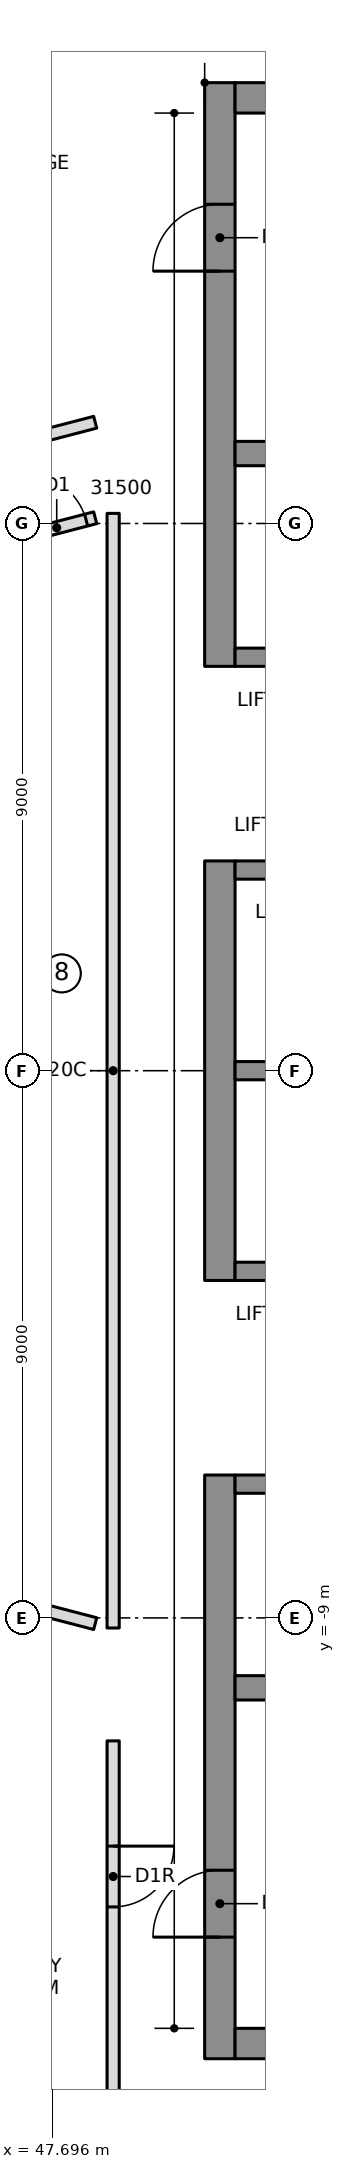
"""IFC4 building model, lengths in metres.
Left out: names, types, materials, properties, quantities, classifications, styles, units other than length and angle.
Written with IfcOpenShell. Run it as: python <this file> out.ifc"""

import sys

from ifc_helpers import new_model, si_unit, direction, frame, frame_2d, origin, place, context, subcontext, project, spatial, rectangle, extrude, element, fill, save


model = new_model("IFC4")
c1 = context("Model", 3, precision=1e-05, world=origin(), true_north=direction((0.0, 1.0)))
c2 = subcontext(c1, "Body", "Model", "MODEL_VIEW")
j1 = project(units=[si_unit("LENGTHUNIT", "METRE"), si_unit("PLANEANGLEUNIT", "RADIAN")], contexts=[c1])
p1 = place(None, origin())
s1 = spatial("IfcSite", under=j1, at=p1, CompositionType="ELEMENT")
p2 = place(p1, origin())
s2 = spatial("IfcBuilding", under=s1, at=p2, CompositionType="ELEMENT")
p3 = place(p2, frame((0.0, 0.0, 313.2)))
s3 = spatial("IfcBuildingStorey", under=s2, at=p3, CompositionType="ELEMENT", Elevation=313.2)
p4 = place(p3, frame((50.45, 6.65, 0.0), z_axis=(0.0, 0.0, 1.0), x_axis=(0.0, 1.0, 0.0)))
e1 = element("IfcWall", 1, at=p4, inside=s3, PredefinedType="SHEAR", context=c2, shape_type="SweptSolid", body=[
    extrude(rectangle(XDim=9.6, YDim=0.5, at=frame_2d((4.8, 0.0))), origin(), (0.0, 0.0, 1.0), 5.4),
])
p5 = place(p4, frame((6.5, 0.0, 0.0)))
e2 = element("IfcOpeningElement", 2, at=p5, cuts=e1, PredefinedType="OPENING", context=c2, shape_type="SweptSolid", body=[
    extrude(rectangle(XDim=1.1, YDim=2.1, at=frame_2d((0.55, 1.05))), frame((0.0, 0.26, 0.0), z_axis=(0.0, -1.0, 0.0), x_axis=(1.0, 0.0, 0.0)), (0.0, 0.0, 1.0), 0.52),
])
p6 = place(p3, frame((50.45, -3.45, 0.0), z_axis=(0.0, 0.0, 1.0), x_axis=(0.0, 1.0, 0.0)))
e3 = element("IfcWall", 3, at=p6, inside=s3, PredefinedType="SHEAR", context=c2, shape_type="SweptSolid", body=[
    extrude(rectangle(XDim=6.9, YDim=0.5, at=frame_2d((3.45, 0.0))), origin(), (0.0, 0.0, 1.0), 5.4),
])
p7 = place(p3, frame((50.45, -16.25, 0.0), z_axis=(0.0, 0.0, 1.0), x_axis=(0.0, 1.0, 0.0)))
e4 = element("IfcWall", 4, at=p7, inside=s3, PredefinedType="SHEAR", context=c2, shape_type="SweptSolid", body=[
    extrude(rectangle(XDim=9.6, YDim=0.5, at=frame_2d((4.8, 0.0))), origin(), (0.0, 0.0, 1.0), 5.4),
])
p8 = place(p7, frame((2.0, 0.0, 0.0)))
e5 = element("IfcOpeningElement", 5, at=p8, cuts=e4, PredefinedType="OPENING", context=c2, shape_type="SweptSolid", body=[
    extrude(rectangle(XDim=1.1, YDim=2.1, at=frame_2d((0.55, 1.05))), frame((0.0, 0.26, 0.0), z_axis=(0.0, -1.0, 0.0), x_axis=(1.0, 0.0, 0.0)), (0.0, 0.0, 1.0), 0.52),
])
for number, where, z_axis, x_axis in (
    (6, (50.7, 16.0, 0.0), (0.0, 0.0, 1.0), (1.0, 0.0, 0.0)),
    (7, (50.7, -16.0, 0.0), (0.0, 0.0, 1.0), (1.0, 0.0, 0.0)),
):
    element("IfcWall", number, at=place(p3, frame(where, z_axis=z_axis, x_axis=x_axis)), inside=s3, PredefinedType="SHEAR", context=c2, shape_type="SweptSolid", body=[
        extrude(rectangle(XDim=13.52, YDim=0.5, at=frame_2d((6.76, 0.0))), origin(), (0.0, 0.0, 1.0), 5.4),
    ])
p9 = place(p3, frame((50.7, 10.15, 0.0), z_axis=(0.0, 0.0, 1.0), x_axis=(1.0, 0.0, 0.0)))
e8 = element("IfcWall", 8, at=p9, inside=s3, PredefinedType="SHEAR", context=c2, shape_type="SweptSolid", body=[
    extrude(rectangle(XDim=13.02, YDim=0.4, at=frame_2d((6.51, 0.0))), origin(), (0.0, 0.0, 1.0), 5.4),
])
p10 = place(p9, frame((0.7, 0.0, 0.0)))
e9 = element("IfcOpeningElement", 9, at=p10, cuts=e8, PredefinedType="OPENING", context=c2, shape_type="SweptSolid", body=[
    extrude(rectangle(XDim=1.1, YDim=2.1, at=frame_2d((0.55, 1.05))), frame((0.0, 0.21, 0.0), z_axis=(0.0, -1.0, 0.0), x_axis=(1.0, 0.0, 0.0)), (0.0, 0.0, 1.0), 0.42),
])
p11 = place(p9, frame((3.5, 0.0, 0.0)))
e10 = element("IfcOpeningElement", 10, at=p11, cuts=e8, PredefinedType="OPENING", context=c2, shape_type="SweptSolid", body=[
    extrude(rectangle(XDim=1.1, YDim=2.1, at=frame_2d((0.55, 1.05))), frame((0.0, 0.21, 0.0), z_axis=(0.0, -1.0, 0.0), x_axis=(1.0, 0.0, 0.0)), (0.0, 0.0, 1.0), 0.42),
])
p12 = place(p3, frame((50.7, -10.15, 0.0), z_axis=(0.0, 0.0, 1.0), x_axis=(1.0, 0.0, 0.0)))
e11 = element("IfcWall", 11, at=p12, inside=s3, PredefinedType="SHEAR", context=c2, shape_type="SweptSolid", body=[
    extrude(rectangle(XDim=13.02, YDim=0.4, at=frame_2d((6.51, 0.0))), origin(), (0.0, 0.0, 1.0), 5.4),
])
p13 = place(p3, frame((50.7, 0.0, 0.0), z_axis=(0.0, 0.0, 1.0), x_axis=(1.0, 0.0, 0.0)))
e12 = element("IfcWall", 12, at=p13, inside=s3, PredefinedType="SHEAR", context=c2, shape_type="SweptSolid", body=[
    extrude(rectangle(XDim=10.9, YDim=0.3, at=frame_2d((5.45, 0.0))), origin(), (0.0, 0.0, 1.0), 5.4),
])
p14 = place(p3, frame((50.7, 3.3, 0.0), z_axis=(0.0, 0.0, 1.0), x_axis=(1.0, 0.0, 0.0)))
e13 = element("IfcWall", 13, at=p14, inside=s3, PredefinedType="SHEAR", context=c2, shape_type="SweptSolid", body=[
    extrude(rectangle(XDim=10.9, YDim=0.3, at=frame_2d((5.45, 0.0))), origin(), (0.0, 0.0, 1.0), 5.4),
])
p15 = place(p14, frame((0.7, 0.0, 0.0)))
e14 = element("IfcOpeningElement", 14, at=p15, cuts=e13, PredefinedType="OPENING", context=c2, shape_type="SweptSolid", body=[
    extrude(rectangle(XDim=1.1, YDim=2.1, at=frame_2d((0.55, 1.05))), frame((0.0, 0.16, 0.0), z_axis=(0.0, -1.0, 0.0), x_axis=(1.0, 0.0, 0.0)), (0.0, 0.0, 1.0), 0.32),
])
p16 = place(p14, frame((3.5, 0.0, 0.0)))
e15 = element("IfcOpeningElement", 15, at=p16, cuts=e13, PredefinedType="OPENING", context=c2, shape_type="SweptSolid", body=[
    extrude(rectangle(XDim=1.1, YDim=2.1, at=frame_2d((0.55, 1.05))), frame((0.0, 0.16, 0.0), z_axis=(0.0, -1.0, 0.0), x_axis=(1.0, 0.0, 0.0)), (0.0, 0.0, 1.0), 0.32),
])
p17 = place(p14, frame((6.4, 0.0, 0.0)))
e16 = element("IfcOpeningElement", 16, at=p17, cuts=e13, PredefinedType="OPENING", context=c2, shape_type="SweptSolid", body=[
    extrude(rectangle(XDim=0.9, YDim=2.1, at=frame_2d((0.45, 1.05))), frame((0.0, 0.16, 0.0), z_axis=(0.0, -1.0, 0.0), x_axis=(1.0, 0.0, 0.0)), (0.0, 0.0, 1.0), 0.32),
])
p18 = place(p14, frame((9.2, 0.0, 0.0)))
e17 = element("IfcOpeningElement", 17, at=p18, cuts=e13, PredefinedType="OPENING", context=c2, shape_type="SweptSolid", body=[
    extrude(rectangle(XDim=0.9, YDim=2.1, at=frame_2d((0.45, 1.05))), frame((0.0, 0.16, 0.0), z_axis=(0.0, -1.0, 0.0), x_axis=(1.0, 0.0, 0.0)), (0.0, 0.0, 1.0), 0.32),
])
p19 = place(p3, frame((50.7, 6.8, 0.0), z_axis=(0.0, 0.0, 1.0), x_axis=(1.0, 0.0, 0.0)))
e18 = element("IfcWall", 18, at=p19, inside=s3, PredefinedType="SHEAR", context=c2, shape_type="SweptSolid", body=[
    extrude(rectangle(XDim=10.9, YDim=0.3, at=frame_2d((5.45, 0.0))), origin(), (0.0, 0.0, 1.0), 5.4),
])
p20 = place(p19, frame((6.4, 0.0, 0.0)))
e19 = element("IfcOpeningElement", 19, at=p20, cuts=e18, PredefinedType="OPENING", context=c2, shape_type="SweptSolid", body=[
    extrude(rectangle(XDim=0.9, YDim=2.1, at=frame_2d((0.45, 1.05))), frame((0.0, 0.16, 0.0), z_axis=(0.0, -1.0, 0.0), x_axis=(1.0, 0.0, 0.0)), (0.0, 0.0, 1.0), 0.32),
])
p21 = place(p19, frame((9.2, 0.0, 0.0)))
e20 = element("IfcOpeningElement", 20, at=p21, cuts=e18, PredefinedType="OPENING", context=c2, shape_type="SweptSolid", body=[
    extrude(rectangle(XDim=0.9, YDim=2.1, at=frame_2d((0.45, 1.05))), frame((0.0, 0.16, 0.0), z_axis=(0.0, -1.0, 0.0), x_axis=(1.0, 0.0, 0.0)), (0.0, 0.0, 1.0), 0.32),
])
p22 = place(p3, frame((50.7, -3.3, 0.0), z_axis=(0.0, 0.0, 1.0), x_axis=(1.0, 0.0, 0.0)))
e21 = element("IfcWall", 21, at=p22, inside=s3, PredefinedType="SHEAR", context=c2, shape_type="SweptSolid", body=[
    extrude(rectangle(XDim=10.9, YDim=0.3, at=frame_2d((5.45, 0.0))), origin(), (0.0, 0.0, 1.0), 5.4),
])
p23 = place(p22, frame((0.7, 0.0, 0.0)))
e22 = element("IfcOpeningElement", 22, at=p23, cuts=e21, PredefinedType="OPENING", context=c2, shape_type="SweptSolid", body=[
    extrude(rectangle(XDim=1.1, YDim=2.1, at=frame_2d((0.55, 1.05))), frame((0.0, 0.16, 0.0), z_axis=(0.0, -1.0, 0.0), x_axis=(1.0, 0.0, 0.0)), (0.0, 0.0, 1.0), 0.32),
])
p24 = place(p22, frame((3.5, 0.0, 0.0)))
e23 = element("IfcOpeningElement", 23, at=p24, cuts=e21, PredefinedType="OPENING", context=c2, shape_type="SweptSolid", body=[
    extrude(rectangle(XDim=1.1, YDim=2.1, at=frame_2d((0.55, 1.05))), frame((0.0, 0.16, 0.0), z_axis=(0.0, -1.0, 0.0), x_axis=(1.0, 0.0, 0.0)), (0.0, 0.0, 1.0), 0.32),
])
p25 = place(p22, frame((6.3, 0.0, 0.0)))
e24 = element("IfcOpeningElement", 24, at=p25, cuts=e21, PredefinedType="OPENING", context=c2, shape_type="SweptSolid", body=[
    extrude(rectangle(XDim=1.1, YDim=2.1, at=frame_2d((0.55, 1.05))), frame((0.0, 0.16, 0.0), z_axis=(0.0, -1.0, 0.0), x_axis=(1.0, 0.0, 0.0)), (0.0, 0.0, 1.0), 0.32),
])
p26 = place(p22, frame((9.1, 0.0, 0.0)))
e25 = element("IfcOpeningElement", 25, at=p26, cuts=e21, PredefinedType="OPENING", context=c2, shape_type="SweptSolid", body=[
    extrude(rectangle(XDim=1.1, YDim=2.1, at=frame_2d((0.55, 1.05))), frame((0.0, 0.16, 0.0), z_axis=(0.0, -1.0, 0.0), x_axis=(1.0, 0.0, 0.0)), (0.0, 0.0, 1.0), 0.32),
])
p27 = place(p3, frame((50.7, -6.8, 0.0), z_axis=(0.0, 0.0, 1.0), x_axis=(1.0, 0.0, 0.0)))
e26 = element("IfcWall", 26, at=p27, inside=s3, PredefinedType="SHEAR", context=c2, shape_type="SweptSolid", body=[
    extrude(rectangle(XDim=10.9, YDim=0.3, at=frame_2d((5.45, 0.0))), origin(), (0.0, 0.0, 1.0), 5.4),
])
p28 = place(p27, frame((6.3, 0.0, 0.0)))
e27 = element("IfcOpeningElement", 27, at=p28, cuts=e26, PredefinedType="OPENING", context=c2, shape_type="SweptSolid", body=[
    extrude(rectangle(XDim=1.1, YDim=2.1, at=frame_2d((0.55, 1.05))), frame((0.0, 0.16, 0.0), z_axis=(0.0, -1.0, 0.0), x_axis=(1.0, 0.0, 0.0)), (0.0, 0.0, 1.0), 0.32),
])
p29 = place(p27, frame((9.1, 0.0, 0.0)))
e28 = element("IfcOpeningElement", 28, at=p29, cuts=e26, PredefinedType="OPENING", context=c2, shape_type="SweptSolid", body=[
    extrude(rectangle(XDim=1.1, YDim=2.1, at=frame_2d((0.55, 1.05))), frame((0.0, 0.16, 0.0), z_axis=(0.0, -1.0, 0.0), x_axis=(1.0, 0.0, 0.0)), (0.0, 0.0, 1.0), 0.32),
])
p30 = place(p27, frame((0.8, 0.0, 0.0)))
e29 = element("IfcOpeningElement", 29, at=p30, cuts=e26, PredefinedType="OPENING", context=c2, shape_type="SweptSolid", body=[
    extrude(rectangle(XDim=0.9, YDim=2.1, at=frame_2d((0.45, 1.05))), frame((0.0, 0.16, 0.0), z_axis=(0.0, -1.0, 0.0), x_axis=(1.0, 0.0, 0.0)), (0.0, 0.0, 1.0), 0.32),
])
p31 = place(p27, frame((3.6, 0.0, 0.0)))
e30 = element("IfcOpeningElement", 30, at=p31, cuts=e26, PredefinedType="OPENING", context=c2, shape_type="SweptSolid", body=[
    extrude(rectangle(XDim=0.9, YDim=2.1, at=frame_2d((0.45, 1.05))), frame((0.0, 0.16, 0.0), z_axis=(0.0, -1.0, 0.0), x_axis=(1.0, 0.0, 0.0)), (0.0, 0.0, 1.0), 0.32),
])
p32 = place(p3, frame((48.4, 10.665, 0.0), z_axis=(0.0, 0.0, 1.0), x_axis=(-0.967689993731, -0.252142967448, 0.0)))
e31 = element("IfcWall", 31, at=p32, inside=s3, PredefinedType="PARTITIONING", context=c2, shape_type="SweptSolid", body=[
    extrude(rectangle(XDim=1.069, YDim=0.2, at=frame_2d((0.534, 0.0))), origin(), (0.0, 0.0, 1.0), 5.1),
])
p33 = place(p3, frame((47.134, 8.764, 0.0), z_axis=(0.0, 0.0, 1.0), x_axis=(0.967678694968, 0.252186326563, 0.0)))
e32 = element("IfcWall", 32, at=p33, inside=s3, PredefinedType="PARTITIONING", context=c2, shape_type="SweptSolid", body=[
    extrude(rectangle(XDim=1.308, YDim=0.2, at=frame_2d((0.654, 0.0))), origin(), (0.0, 0.0, 1.0), 5.1),
])
p34 = place(p33, frame((0.154, 0.0, 0.0)))
e33 = element("IfcOpeningElement", 33, at=p34, cuts=e32, PredefinedType="OPENING", context=c2, shape_type="SweptSolid", body=[
    extrude(rectangle(XDim=1.0, YDim=2.1, at=frame_2d((0.5, 1.05))), frame((0.0, 0.11, 0.0), z_axis=(0.0, -1.0, 0.0), x_axis=(1.0, 0.0, 0.0)), (0.0, 0.0, 1.0), 0.22),
])
p35 = place(p3, frame((48.4, -9.094, 0.0), z_axis=(0.0, 0.0, 1.0), x_axis=(-0.967678694968, 0.252186326563, 0.0)))
e34 = element("IfcWall", 34, at=p35, inside=s3, PredefinedType="PARTITIONING", context=c2, shape_type="SweptSolid", body=[
    extrude(rectangle(XDim=1.308, YDim=0.2, at=frame_2d((0.654, 0.0))), origin(), (0.0, 0.0, 1.0), 5.1),
])
p36 = place(p3, frame((48.695, -11.022, 0.0), z_axis=(0.0, 0.0, 1.0), x_axis=(0.0, -1.0, 0.0)))
e35 = element("IfcWall", 35, at=p36, inside=s3, PredefinedType="PARTITIONING", context=c2, shape_type="SweptSolid", body=[
    extrude(rectangle(XDim=7.567, YDim=0.2, at=frame_2d((3.783, 0.0))), origin(), (0.0, 0.0, 1.0), 5.1),
])
p37 = place(p36, frame((1.731, 0.0, 0.0)))
e36 = element("IfcOpeningElement", 36, at=p37, cuts=e35, PredefinedType="OPENING", context=c2, shape_type="SweptSolid", body=[
    extrude(rectangle(XDim=1.0, YDim=2.1, at=frame_2d((0.5, 1.05))), frame((0.0, 0.11, 0.0), z_axis=(0.0, -1.0, 0.0), x_axis=(1.0, 0.0, 0.0)), (0.0, 0.0, 1.0), 0.22),
])
p38 = place(p3, frame((48.695, 9.166, 0.0), z_axis=(0.0, 0.0, 1.0), x_axis=(0.0, -1.0, 0.0)))
e37 = element("IfcWall", 37, at=p38, inside=s3, PredefinedType="PARTITIONING", context=c2, shape_type="SweptSolid", body=[
    extrude(rectangle(XDim=18.332, YDim=0.2, at=frame_2d((9.166, 0.0))), origin(), (0.0, 0.0, 1.0), 5.1),
])
p39 = place(p34, origin())
e38 = element("IfcDoor", 38, at=p39, inside=s3, OperationType="SINGLE_SWING_LEFT", PredefinedType="DOOR", context=c2, shape_type="SweptSolid", body=[
    extrude(rectangle(XDim=1.0, YDim=2.1, at=frame_2d((0.5, 1.05))), frame((0.0, 0.025, 0.0), z_axis=(0.0, -1.0, 0.0), x_axis=(1.0, 0.0, 0.0)), (0.0, 0.0, 1.0), 0.05),
])
fill(e33, e38)
p40 = place(p37, origin())
e39 = element("IfcDoor", 39, at=p40, inside=s3, OperationType="SINGLE_SWING_RIGHT", PredefinedType="DOOR", context=c2, shape_type="SweptSolid", body=[
    extrude(rectangle(XDim=1.0, YDim=2.1, at=frame_2d((0.5, 1.05))), frame((0.0, 0.025, 0.0), z_axis=(0.0, -1.0, 0.0), x_axis=(1.0, 0.0, 0.0)), (0.0, 0.0, 1.0), 0.05),
])
fill(e36, e39)
p41 = place(p5, origin())
e40 = element("IfcDoor", 40, at=p41, inside=s3, OperationType="SINGLE_SWING_RIGHT", PredefinedType="DOOR", context=c2, shape_type="SweptSolid", body=[
    extrude(rectangle(XDim=1.1, YDim=2.1, at=frame_2d((0.55, 1.05))), frame((0.0, 0.025, 0.0), z_axis=(0.0, -1.0, 0.0), x_axis=(1.0, 0.0, 0.0)), (0.0, 0.0, 1.0), 0.05),
])
fill(e2, e40)
p42 = place(p8, origin())
e41 = element("IfcDoor", 41, at=p42, inside=s3, OperationType="SINGLE_SWING_RIGHT", PredefinedType="DOOR", context=c2, shape_type="SweptSolid", body=[
    extrude(rectangle(XDim=1.1, YDim=2.1, at=frame_2d((0.55, 1.05))), frame((0.0, 0.025, 0.0), z_axis=(0.0, -1.0, 0.0), x_axis=(1.0, 0.0, 0.0)), (0.0, 0.0, 1.0), 0.05),
])
fill(e5, e41)
save(model, sys.argv[1])
